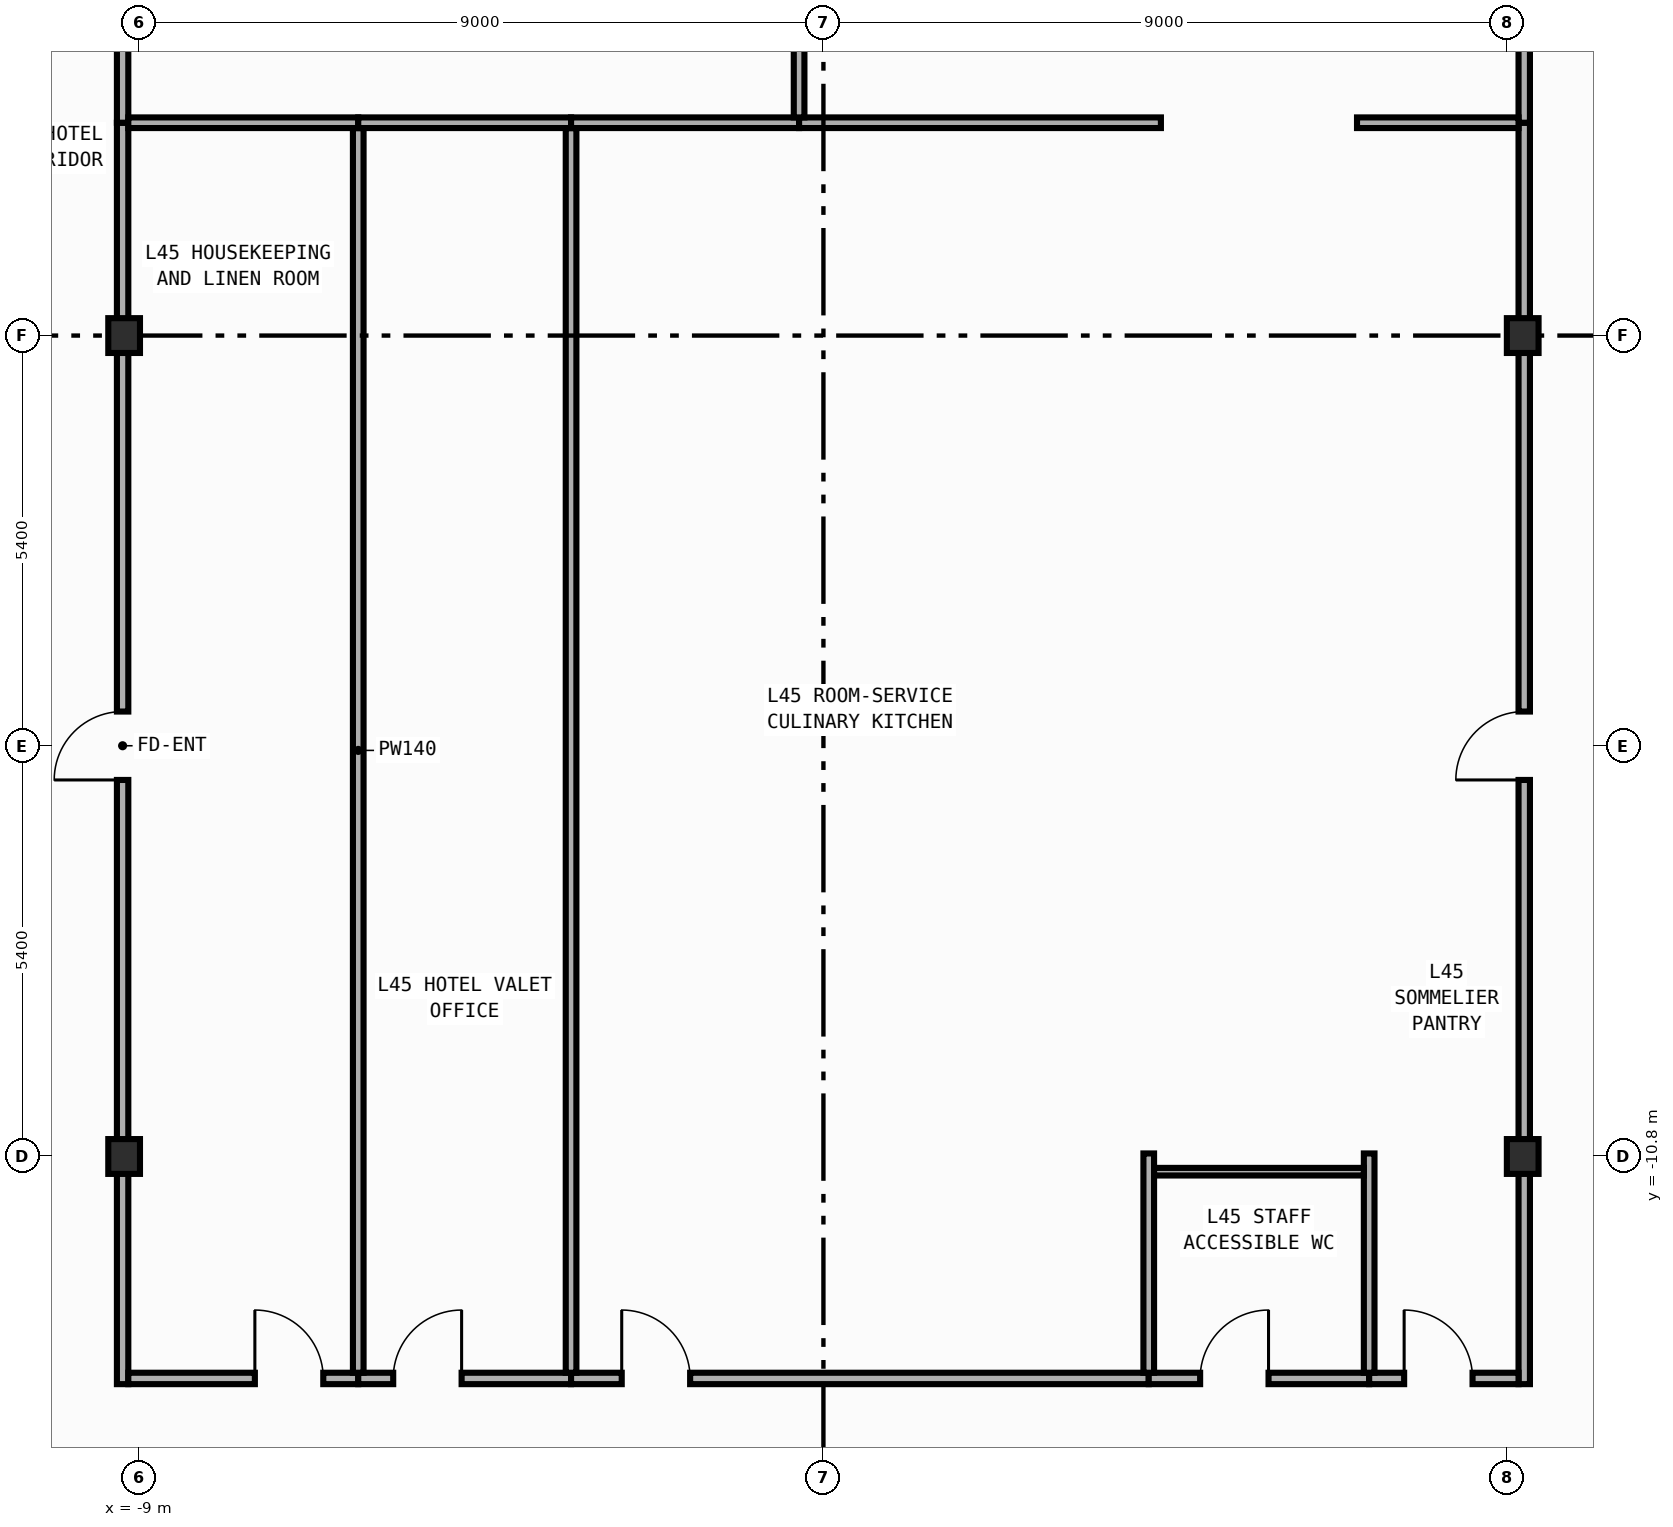
"""IFC4 building model, lengths in metres.
Left out: names, types, materials, properties, quantities, classifications, styles, units other than length and angle.
Written with IfcOpenShell. Run it as: python <this file> out.ifc"""

import sys

from ifc_helpers import new_model, si_unit, direction, frame, frame_2d, origin, origin_2d, place, context, subcontext, project, spatial, rectangle, i_section, extrude, element, fill, save


model = new_model("IFC4")
c1 = context("Model", 3, precision=1e-05, world=origin(), true_north=direction((0.0, 1.0)))
c2 = subcontext(c1, "Body", "Model", "MODEL_VIEW")
j1 = project(units=[si_unit("LENGTHUNIT", "METRE"), si_unit("PLANEANGLEUNIT", "RADIAN")], contexts=[c1])
p1 = place(None, origin())
s1 = spatial("IfcSite", under=j1, at=p1, CompositionType="ELEMENT")
p2 = place(p1, origin())
s2 = spatial("IfcBuilding", under=s1, at=p2, CompositionType="ELEMENT")
p3 = place(p2, frame((0.0, 0.0, 195.4)))
s3 = spatial("IfcBuildingStorey", under=s2, at=p3, CompositionType="ELEMENT", Elevation=195.4)
for number, where, z_axis, x_axis in (
    (1, (-9.2, -10.8, 0.0), (0.0, 0.0, 1.0), (1.0, 0.0, 0.0)),
    (2, (-9.2, 0.0, 0.0), (0.0, 0.0, 1.0), (1.0, 0.0, 0.0)),
    (3, (9.2, -10.8, 0.0), (0.0, 0.0, 1.0), (1.0, 0.0, 0.0)),
    (4, (9.2, 0.0, 0.0), (0.0, 0.0, 1.0), (1.0, 0.0, 0.0)),
):
    element("IfcColumn", number, at=place(p3, frame(where, z_axis=z_axis, x_axis=x_axis)), inside=s3, PredefinedType="COLUMN", context=c2, shape_type="SweptSolid", body=[
        extrude(i_section(OverallWidth=0.417, OverallDepth=0.458, WebThickness=0.03, FlangeThickness=0.05, FilletRadius=0.022, at=origin_2d()), origin(), (0.0, 0.0, 1.0), 3.8),
    ])
p4 = place(p3, frame((-9.22, -13.795, 0.0), z_axis=(0.0, 0.0, 1.0), x_axis=(0.0, 1.0, 0.0)))
e5 = element("IfcWall", 5, at=p4, inside=s3, PredefinedType="PARTITIONING", context=c2, shape_type="SweptSolid", body=[
    extrude(rectangle(XDim=16.595, YDim=0.15, at=frame_2d((8.297, 0.0))), origin(), (0.0, 0.0, 1.0), 2.952),
])
p5 = place(p4, frame((7.949, 0.0, 0.0)))
e6 = element("IfcOpeningElement", 6, at=p5, cuts=e5, PredefinedType="OPENING", context=c2, shape_type="SweptSolid", body=[
    extrude(rectangle(XDim=0.9, YDim=2.15, at=frame_2d((0.45, 1.075))), frame((0.0, 0.085, 0.0), z_axis=(0.0, -1.0, 0.0), x_axis=(1.0, 0.0, 0.0)), (0.0, 0.0, 1.0), 0.17),
])
p6 = place(p3, frame((-9.22, 2.8, 0.0), z_axis=(0.0, 0.0, 1.0), x_axis=(0.0, 1.0, 0.0)))
e7 = element("IfcWall", 7, at=p6, inside=s3, PredefinedType="PARTITIONING", context=c2, shape_type="SweptSolid", body=[
    extrude(rectangle(XDim=12.795, YDim=0.15, at=frame_2d((6.397, 0.0))), origin(), (0.0, 0.0, 1.0), 2.952),
])
p7 = place(p6, frame((2.086, 0.0, 0.0)))
e8 = element("IfcOpeningElement", 8, at=p7, cuts=e7, PredefinedType="OPENING", context=c2, shape_type="SweptSolid", body=[
    extrude(rectangle(XDim=0.9, YDim=2.15, at=frame_2d((0.45, 1.075))), frame((0.0, 0.085, 0.0), z_axis=(0.0, -1.0, 0.0), x_axis=(1.0, 0.0, 0.0)), (0.0, 0.0, 1.0), 0.17),
])
p8 = place(p3, frame((9.22, -13.795, 0.0), z_axis=(0.0, 0.0, 1.0), x_axis=(0.0, 1.0, 0.0)))
e9 = element("IfcWall", 9, at=p8, inside=s3, PredefinedType="PARTITIONING", context=c2, shape_type="SweptSolid", body=[
    extrude(rectangle(XDim=16.595, YDim=0.15, at=frame_2d((8.297, 0.0))), origin(), (0.0, 0.0, 1.0), 2.952),
])
p9 = place(p8, frame((7.949, 0.0, 0.0)))
e10 = element("IfcOpeningElement", 10, at=p9, cuts=e9, PredefinedType="OPENING", context=c2, shape_type="SweptSolid", body=[
    extrude(rectangle(XDim=0.9, YDim=2.15, at=frame_2d((0.45, 1.075))), frame((0.0, 0.085, 0.0), z_axis=(0.0, -1.0, 0.0), x_axis=(1.0, 0.0, 0.0)), (0.0, 0.0, 1.0), 0.17),
])
p10 = place(p3, frame((9.22, 2.8, 0.0), z_axis=(0.0, 0.0, 1.0), x_axis=(0.0, 1.0, 0.0)))
e11 = element("IfcWall", 11, at=p10, inside=s3, PredefinedType="PARTITIONING", context=c2, shape_type="SweptSolid", body=[
    extrude(rectangle(XDim=12.795, YDim=0.15, at=frame_2d((6.397, 0.0))), origin(), (0.0, 0.0, 1.0), 2.952),
])
p11 = place(p10, frame((2.086, 0.0, 0.0)))
e12 = element("IfcOpeningElement", 12, at=p11, cuts=e11, PredefinedType="OPENING", context=c2, shape_type="SweptSolid", body=[
    extrude(rectangle(XDim=0.9, YDim=2.15, at=frame_2d((0.45, 1.075))), frame((0.0, 0.085, 0.0), z_axis=(0.0, -1.0, 0.0), x_axis=(1.0, 0.0, 0.0)), (0.0, 0.0, 1.0), 0.17),
])
p12 = place(p3, frame((-9.145, -13.72, 0.0), z_axis=(0.0, 0.0, 1.0), x_axis=(1.0, 0.0, 0.0)))
e13 = element("IfcWall", 13, at=p12, inside=s3, PredefinedType="PARTITIONING", context=c2, shape_type="SweptSolid", body=[
    extrude(rectangle(XDim=3.025, YDim=0.15, at=frame_2d((1.512, 0.0))), origin(), (0.0, 0.0, 1.0), 3.54),
])
p13 = place(p12, frame((1.665, 0.0, 0.0)))
e14 = element("IfcOpeningElement", 14, at=p13, cuts=e13, PredefinedType="OPENING", context=c2, shape_type="SweptSolid", body=[
    extrude(rectangle(XDim=0.9, YDim=2.15, at=frame_2d((0.45, 1.075))), frame((0.0, 0.085, 0.0), z_axis=(0.0, -1.0, 0.0), x_axis=(1.0, 0.0, 0.0)), (0.0, 0.0, 1.0), 0.17),
])
p14 = place(p3, frame((-6.12, -13.72, 0.0), z_axis=(0.0, 0.0, 1.0), x_axis=(1.0, 0.0, 0.0)))
e15 = element("IfcWall", 15, at=p14, inside=s3, PredefinedType="PARTITIONING", context=c2, shape_type="SweptSolid", body=[
    extrude(rectangle(XDim=2.8, YDim=0.15, at=frame_2d((1.4, 0.0))), origin(), (0.0, 0.0, 1.0), 3.54),
])
p15 = place(p14, frame((0.46, 0.0, 0.0)))
e16 = element("IfcOpeningElement", 16, at=p15, cuts=e15, PredefinedType="OPENING", context=c2, shape_type="SweptSolid", body=[
    extrude(rectangle(XDim=0.9, YDim=2.15, at=frame_2d((0.45, 1.075))), frame((0.0, 0.085, 0.0), z_axis=(0.0, -1.0, 0.0), x_axis=(1.0, 0.0, 0.0)), (0.0, 0.0, 1.0), 0.17),
])
p16 = place(p3, frame((-3.32, -13.72, 0.0), z_axis=(0.0, 0.0, 1.0), x_axis=(1.0, 0.0, 0.0)))
e17 = element("IfcWall", 17, at=p16, inside=s3, PredefinedType="PARTITIONING", context=c2, shape_type="SweptSolid", body=[
    extrude(rectangle(XDim=7.6, YDim=0.15, at=frame_2d((3.8, 0.0))), origin(), (0.0, 0.0, 1.0), 3.54),
])
p17 = place(p16, frame((0.667, 0.0, 0.0)))
e18 = element("IfcOpeningElement", 18, at=p17, cuts=e17, PredefinedType="OPENING", context=c2, shape_type="SweptSolid", body=[
    extrude(rectangle(XDim=0.9, YDim=2.15, at=frame_2d((0.45, 1.075))), frame((0.0, 0.085, 0.0), z_axis=(0.0, -1.0, 0.0), x_axis=(1.0, 0.0, 0.0)), (0.0, 0.0, 1.0), 0.17),
])
p18 = place(p3, frame((4.28, -13.72, 0.0), z_axis=(0.0, 0.0, 1.0), x_axis=(1.0, 0.0, 0.0)))
e19 = element("IfcWall", 19, at=p18, inside=s3, PredefinedType="PARTITIONING", context=c2, shape_type="SweptSolid", body=[
    extrude(rectangle(XDim=2.9, YDim=0.15, at=frame_2d((1.45, 0.0))), origin(), (0.0, 0.0, 1.0), 3.54),
])
p19 = place(p18, frame((0.676, 0.0, 0.0)))
e20 = element("IfcOpeningElement", 20, at=p19, cuts=e19, PredefinedType="OPENING", context=c2, shape_type="SweptSolid", body=[
    extrude(rectangle(XDim=0.9, YDim=2.15, at=frame_2d((0.45, 1.075))), frame((0.0, 0.085, 0.0), z_axis=(0.0, -1.0, 0.0), x_axis=(1.0, 0.0, 0.0)), (0.0, 0.0, 1.0), 0.17),
])
p20 = place(p3, frame((7.18, -13.72, 0.0), z_axis=(0.0, 0.0, 1.0), x_axis=(1.0, 0.0, 0.0)))
e21 = element("IfcWall", 21, at=p20, inside=s3, PredefinedType="PARTITIONING", context=c2, shape_type="SweptSolid", body=[
    extrude(rectangle(XDim=1.965, YDim=0.15, at=frame_2d((0.982, 0.0))), origin(), (0.0, 0.0, 1.0), 3.54),
])
p21 = place(p20, frame((0.46, 0.0, 0.0)))
e22 = element("IfcOpeningElement", 22, at=p21, cuts=e21, PredefinedType="OPENING", context=c2, shape_type="SweptSolid", body=[
    extrude(rectangle(XDim=0.9, YDim=2.15, at=frame_2d((0.45, 1.075))), frame((0.0, 0.085, 0.0), z_axis=(0.0, -1.0, 0.0), x_axis=(1.0, 0.0, 0.0)), (0.0, 0.0, 1.0), 0.17),
])
p22 = place(p3, frame((-6.12, -13.645, 0.0), z_axis=(0.0, 0.0, 1.0), x_axis=(0.0, 1.0, 0.0)))
e23 = element("IfcWall", 23, at=p22, inside=s3, PredefinedType="PARTITIONING", context=c2, shape_type="SweptSolid", body=[
    extrude(rectangle(XDim=16.375, YDim=0.14, at=frame_2d((8.188, 0.0))), origin(), (0.0, 0.0, 1.0), 3.54),
])
p23 = place(p3, frame((-9.145, 2.8, 0.0), z_axis=(0.0, 0.0, 1.0), x_axis=(1.0, 0.0, 0.0)))
e24 = element("IfcWall", 24, at=p23, inside=s3, PredefinedType="PARTITIONING", context=c2, shape_type="SweptSolid", body=[
    extrude(rectangle(XDim=3.025, YDim=0.14, at=frame_2d((1.512, 0.0))), origin(), (0.0, 0.0, 1.0), 3.54),
])
p24 = place(p3, frame((-3.32, -13.645, 0.0), z_axis=(0.0, 0.0, 1.0), x_axis=(0.0, 1.0, 0.0)))
e25 = element("IfcWall", 25, at=p24, inside=s3, PredefinedType="PARTITIONING", context=c2, shape_type="SweptSolid", body=[
    extrude(rectangle(XDim=16.375, YDim=0.14, at=frame_2d((8.188, 0.0))), origin(), (0.0, 0.0, 1.0), 3.54),
])
p25 = place(p3, frame((-6.12, 2.8, 0.0), z_axis=(0.0, 0.0, 1.0), x_axis=(1.0, 0.0, 0.0)))
e26 = element("IfcWall", 26, at=p25, inside=s3, PredefinedType="PARTITIONING", context=c2, shape_type="SweptSolid", body=[
    extrude(rectangle(XDim=2.8, YDim=0.14, at=frame_2d((1.4, 0.0))), origin(), (0.0, 0.0, 1.0), 3.54),
])
p26 = place(p3, frame((4.28, -13.645, 0.0), z_axis=(0.0, 0.0, 1.0), x_axis=(0.0, 1.0, 0.0)))
e27 = element("IfcWall", 27, at=p26, inside=s3, PredefinedType="PARTITIONING", context=c2, shape_type="SweptSolid", body=[
    extrude(rectangle(XDim=2.885, YDim=0.14, at=frame_2d((1.442, 0.0))), origin(), (0.0, 0.0, 1.0), 3.54),
])
p27 = place(p3, frame((-3.32, 2.8, 0.0), z_axis=(0.0, 0.0, 1.0), x_axis=(1.0, 0.0, 0.0)))
e28 = element("IfcWall", 28, at=p27, inside=s3, PredefinedType="PARTITIONING", context=c2, shape_type="SweptSolid", body=[
    extrude(rectangle(XDim=3.0, YDim=0.14, at=frame_2d((1.5, 0.0))), origin(), (0.0, 0.0, 1.0), 3.54),
])
p28 = place(p3, frame((-0.32, 2.8, 0.0), z_axis=(0.0, 0.0, 1.0), x_axis=(1.0, 0.0, 0.0)))
e29 = element("IfcWall", 29, at=p28, inside=s3, PredefinedType="PARTITIONING", context=c2, shape_type="SweptSolid", body=[
    extrude(rectangle(XDim=4.76, YDim=0.14, at=frame_2d((2.38, 0.0))), origin(), (0.0, 0.0, 1.0), 3.54),
])
p29 = place(p3, frame((7.18, -13.645, 0.0), z_axis=(0.0, 0.0, 1.0), x_axis=(0.0, 1.0, 0.0)))
e30 = element("IfcWall", 30, at=p29, inside=s3, PredefinedType="PARTITIONING", context=c2, shape_type="SweptSolid", body=[
    extrude(rectangle(XDim=2.885, YDim=0.14, at=frame_2d((1.442, 0.0))), origin(), (0.0, 0.0, 1.0), 3.54),
])
p30 = place(p3, frame((7.02, 2.8, 0.0), z_axis=(0.0, 0.0, 1.0), x_axis=(1.0, 0.0, 0.0)))
e31 = element("IfcWall", 31, at=p30, inside=s3, PredefinedType="PARTITIONING", context=c2, shape_type="SweptSolid", body=[
    extrude(rectangle(XDim=2.125, YDim=0.14, at=frame_2d((1.062, 0.0))), origin(), (0.0, 0.0, 1.0), 3.54),
])
p31 = place(p3, frame((-0.32, 2.87, 0.0), z_axis=(0.0, 0.0, 1.0), x_axis=(0.0, 1.0, 0.0)))
e32 = element("IfcWall", 32, at=p31, inside=s3, PredefinedType="PARTITIONING", context=c2, shape_type="SweptSolid", body=[
    extrude(rectangle(XDim=12.575, YDim=0.14, at=frame_2d((6.288, 0.0))), origin(), (0.0, 0.0, 1.0), 3.54),
])
p32 = place(p3, frame((4.35, -11.0, 0.0), z_axis=(0.0, 0.0, 1.0), x_axis=(1.0, 0.0, 0.0)))
e33 = element("IfcWall", 33, at=p32, inside=s3, PredefinedType="PARTITIONING", context=c2, shape_type="SweptSolid", body=[
    extrude(rectangle(XDim=2.76, YDim=0.1, at=frame_2d((1.38, 0.0))), origin(), (0.0, 0.0, 1.0), 2.952),
])
p33 = place(p5, origin())
e34 = element("IfcDoor", 34, at=p33, inside=s3, OperationType="SINGLE_SWING_LEFT", PredefinedType="DOOR", context=c2, shape_type="SweptSolid", body=[
    extrude(rectangle(XDim=0.9, YDim=2.15, at=frame_2d((0.45, 1.075))), frame((0.0, 0.025, 0.0), z_axis=(0.0, -1.0, 0.0), x_axis=(1.0, 0.0, 0.0)), (0.0, 0.0, 1.0), 0.05),
])
fill(e6, e34)
p34 = place(p9, origin())
e35 = element("IfcDoor", 35, at=p34, inside=s3, OperationType="SINGLE_SWING_LEFT", PredefinedType="DOOR", context=c2, shape_type="SweptSolid", body=[
    extrude(rectangle(XDim=0.9, YDim=2.15, at=frame_2d((0.45, 1.075))), frame((0.0, 0.025, 0.0), z_axis=(0.0, -1.0, 0.0), x_axis=(1.0, 0.0, 0.0)), (0.0, 0.0, 1.0), 0.05),
])
fill(e10, e35)
p35 = place(p13, origin())
e36 = element("IfcDoor", 36, at=p35, inside=s3, OperationType="SINGLE_SWING_LEFT", PredefinedType="DOOR", context=c2, shape_type="SweptSolid", body=[
    extrude(rectangle(XDim=0.9, YDim=2.15, at=frame_2d((0.45, 1.075))), frame((0.0, 0.025, 0.0), z_axis=(0.0, -1.0, 0.0), x_axis=(1.0, 0.0, 0.0)), (0.0, 0.0, 1.0), 0.05),
])
fill(e14, e36)
p36 = place(p15, origin())
e37 = element("IfcDoor", 37, at=p36, inside=s3, OperationType="SINGLE_SWING_RIGHT", PredefinedType="DOOR", context=c2, shape_type="SweptSolid", body=[
    extrude(rectangle(XDim=0.9, YDim=2.15, at=frame_2d((0.45, 1.075))), frame((0.0, 0.025, 0.0), z_axis=(0.0, -1.0, 0.0), x_axis=(1.0, 0.0, 0.0)), (0.0, 0.0, 1.0), 0.05),
])
fill(e16, e37)
p37 = place(p17, origin())
e38 = element("IfcDoor", 38, at=p37, inside=s3, OperationType="SINGLE_SWING_LEFT", PredefinedType="DOOR", context=c2, shape_type="SweptSolid", body=[
    extrude(rectangle(XDim=0.9, YDim=2.15, at=frame_2d((0.45, 1.075))), frame((0.0, 0.025, 0.0), z_axis=(0.0, -1.0, 0.0), x_axis=(1.0, 0.0, 0.0)), (0.0, 0.0, 1.0), 0.05),
])
fill(e18, e38)
p38 = place(p19, origin())
e39 = element("IfcDoor", 39, at=p38, inside=s3, OperationType="SINGLE_SWING_RIGHT", PredefinedType="DOOR", context=c2, shape_type="SweptSolid", body=[
    extrude(rectangle(XDim=0.9, YDim=2.15, at=frame_2d((0.45, 1.075))), frame((0.0, 0.025, 0.0), z_axis=(0.0, -1.0, 0.0), x_axis=(1.0, 0.0, 0.0)), (0.0, 0.0, 1.0), 0.05),
])
fill(e20, e39)
p39 = place(p21, origin())
e40 = element("IfcDoor", 40, at=p39, inside=s3, OperationType="SINGLE_SWING_LEFT", PredefinedType="DOOR", context=c2, shape_type="SweptSolid", body=[
    extrude(rectangle(XDim=0.9, YDim=2.15, at=frame_2d((0.45, 1.075))), frame((0.0, 0.025, 0.0), z_axis=(0.0, -1.0, 0.0), x_axis=(1.0, 0.0, 0.0)), (0.0, 0.0, 1.0), 0.05),
])
fill(e22, e40)
save(model, sys.argv[1])
